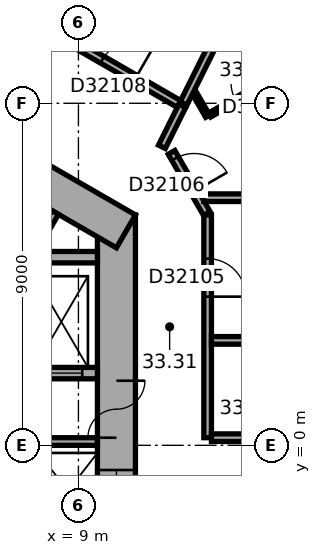
"""IFC4 building model, lengths in metres.
Left out: names, types, materials, properties, quantities, classifications, styles, units other than length and angle.
Written with IfcOpenShell. Run it as: python <this file> out.ifc"""

import sys

from ifc_helpers import new_model, si_unit, direction, frame, frame_2d, origin, place, context, subcontext, project, spatial, rectangle, extrude, element, fill, save


model = new_model("IFC4")
c1 = context("Model", 3, precision=1e-05, world=origin(), true_north=direction((0.0, 1.0)))
c2 = subcontext(c1, "Body", "Model", "MODEL_VIEW")
j1 = project(units=[si_unit("LENGTHUNIT", "METRE"), si_unit("PLANEANGLEUNIT", "RADIAN")], contexts=[c1])
p1 = place(None, origin())
s1 = spatial("IfcSite", under=j1, at=p1, CompositionType="ELEMENT")
p2 = place(p1, origin())
s2 = spatial("IfcBuilding", under=s1, at=p2, CompositionType="ELEMENT")
p3 = place(p2, frame((0.0, 0.0, 135.5)))
s3 = spatial("IfcBuildingStorey", under=s2, at=p3, CompositionType="ELEMENT", Elevation=135.5)
p4 = place(p3, frame((10.0, -6.062, 0.0), z_axis=(0.0, 0.0, 1.0), x_axis=(0.0, 1.0, 0.0)))
e1 = element("IfcWall", 1, at=p4, inside=s3, PredefinedType="SHEAR", context=c2, shape_type="SweptSolid", body=[
    extrude(rectangle(XDim=12.125, YDim=1.0, at=frame_2d((6.062, 0.0))), origin(), (0.0, 0.0, 1.0), 3.7),
])
p5 = place(p4, frame((6.262, 0.0, 0.0)))
e2 = element("IfcOpeningElement", 2, at=p5, cuts=e1, PredefinedType="OPENING", context=c2, shape_type="SweptSolid", body=[
    extrude(rectangle(XDim=1.5, YDim=2.1, at=frame_2d((0.75, 1.05))), frame((0.0, 0.51, 0.0), z_axis=(0.0, -1.0, 0.0), x_axis=(1.0, 0.0, 0.0)), (0.0, 0.0, 1.0), 1.02),
])
p6 = place(p4, frame((1.712, 0.0, 0.0)))
e3 = element("IfcOpeningElement", 3, at=p6, cuts=e1, PredefinedType="OPENING", context=c2, shape_type="SweptSolid", body=[
    extrude(rectangle(XDim=1.1, YDim=2.1, at=frame_2d((0.55, 1.05))), frame((0.0, 0.51, 0.0), z_axis=(0.0, -1.0, 0.0), x_axis=(1.0, 0.0, 0.0)), (0.0, 0.0, 1.0), 1.02),
])
p7 = place(p4, frame((4.312, 0.0, 0.0)))
e4 = element("IfcOpeningElement", 4, at=p7, cuts=e1, PredefinedType="OPENING", context=c2, shape_type="SweptSolid", body=[
    extrude(rectangle(XDim=1.1, YDim=2.1, at=frame_2d((0.55, 1.05))), frame((0.0, 0.51, 0.0), z_axis=(0.0, -1.0, 0.0), x_axis=(1.0, 0.0, 0.0)), (0.0, 0.0, 1.0), 1.02),
])
p8 = place(p3, frame((10.25, 5.629, 0.0), z_axis=(0.0, 0.0, 1.0), x_axis=(-0.866022616891, 0.50000482701, 0.0)))
e5 = element("IfcWall", 5, at=p8, inside=s3, PredefinedType="SHEAR", context=c2, shape_type="SweptSolid", body=[
    extrude(rectangle(XDim=12.125, YDim=1.0, at=frame_2d((6.062, 0.0))), origin(), (0.0, 0.0, 1.0), 3.7),
])
p9 = place(p8, frame((2.612, 0.0, 0.0)))
e6 = element("IfcOpeningElement", 6, at=p9, cuts=e5, PredefinedType="OPENING", context=c2, shape_type="SweptSolid", body=[
    extrude(rectangle(XDim=1.1, YDim=2.1, at=frame_2d((0.55, 1.05))), frame((0.0, 0.51, 0.0), z_axis=(0.0, -1.0, 0.0), x_axis=(1.0, 0.0, 0.0)), (0.0, 0.0, 1.0), 1.02),
])
p10 = place(p8, frame((5.212, 0.0, 0.0)))
e7 = element("IfcOpeningElement", 7, at=p10, cuts=e5, PredefinedType="OPENING", context=c2, shape_type="SweptSolid", body=[
    extrude(rectangle(XDim=1.1, YDim=2.1, at=frame_2d((0.55, 1.05))), frame((0.0, 0.51, 0.0), z_axis=(0.0, -1.0, 0.0), x_axis=(1.0, 0.0, 0.0)), (0.0, 0.0, 1.0), 1.02),
])
p11 = place(p8, frame((7.812, 0.0, 0.0)))
e8 = element("IfcOpeningElement", 8, at=p11, cuts=e5, PredefinedType="OPENING", context=c2, shape_type="SweptSolid", body=[
    extrude(rectangle(XDim=1.1, YDim=2.1, at=frame_2d((0.55, 1.05))), frame((0.0, 0.51, 0.0), z_axis=(0.0, -1.0, 0.0), x_axis=(1.0, 0.0, 0.0)), (0.0, 0.0, 1.0), 1.02),
])
for number, where, z_axis, x_axis in (
    (9, (7.3, 0.1, 0.0), (0.0, 0.0, 1.0), (1.0, 0.0, 0.0)),
    (10, (7.287, 4.222, 0.0), (0.0, 0.0, 1.0), (0.5, 0.866, 0.0)),
):
    element("IfcWall", number, at=place(p3, frame(where, z_axis=z_axis, x_axis=x_axis)), inside=s3, PredefinedType="PARTITIONING", context=c2, shape_type="SweptSolid", body=[
        extrude(rectangle(XDim=2.2, YDim=0.2, at=frame_2d((1.1, 0.0))), origin(), (0.0, 0.0, 1.0), 3.35),
    ])
p12 = place(p3, frame((7.3, 1.9, 0.0), z_axis=(0.0, 0.0, 1.0), x_axis=(1.0, 0.0, 0.0)))
e11 = element("IfcWall", 11, at=p12, inside=s3, PredefinedType="SHEAR", context=c2, shape_type="SweptSolid", body=[
    extrude(rectangle(XDim=2.2, YDim=0.3, at=frame_2d((1.1, 0.0))), origin(), (0.0, 0.0, 1.0), 3.35),
])
p13 = place(p12, frame((0.7, 0.0, 0.0)))
e12 = element("IfcOpeningElement", 12, at=p13, cuts=e11, PredefinedType="OPENING", context=c2, shape_type="SweptSolid", body=[
    extrude(rectangle(XDim=1.1, YDim=2.1, at=frame_2d((0.55, 1.05))), frame((0.0, 0.16, 0.0), z_axis=(0.0, -1.0, 0.0), x_axis=(1.0, 0.0, 0.0)), (0.0, 0.0, 1.0), 0.32),
])
p14 = place(p3, frame((7.3, 4.95, 0.0), z_axis=(0.0, 0.0, 1.0), x_axis=(1.0, 0.0, 0.0)))
e13 = element("IfcWall", 13, at=p14, inside=s3, PredefinedType="SHEAR", context=c2, shape_type="SweptSolid", body=[
    extrude(rectangle(XDim=2.2, YDim=0.3, at=frame_2d((1.1, 0.0))), origin(), (0.0, 0.0, 1.0), 3.35),
])
p15 = place(p3, frame((11.196, 7.854, 0.0), z_axis=(0.0, 0.0, 1.0), x_axis=(0.446241040303, 0.894912808015, 0.0)))
e14 = element("IfcWall", 14, at=p15, inside=s3, PredefinedType="PARTITIONING", context=c2, shape_type="SweptSolid", body=[
    extrude(rectangle(XDim=1.205, YDim=0.2, at=frame_2d((0.603, 0.0))), origin(), (0.0, 0.0, 1.0), 3.35),
])
p16 = place(p3, frame((11.646, 8.981, 0.0), z_axis=(0.0, 0.0, 1.0), x_axis=(-0.866027142779, 0.499996987961, 0.0)))
e15 = element("IfcWall", 15, at=p16, inside=s3, PredefinedType="PARTITIONING", context=c2, shape_type="SweptSolid", body=[
    extrude(rectangle(XDim=9.597, YDim=0.2, at=frame_2d((4.798, 0.0))), origin(), (0.0, 0.0, 1.0), 3.35),
])
p17 = place(p16, frame((1.331, 0.0, 0.0)))
e16 = element("IfcOpeningElement", 16, at=p17, cuts=e15, PredefinedType="OPENING", context=c2, shape_type="SweptSolid", body=[
    extrude(rectangle(XDim=1.0, YDim=2.1, at=frame_2d((0.5, 1.05))), frame((0.0, 0.11, 0.0), z_axis=(0.0, -1.0, 0.0), x_axis=(1.0, 0.0, 0.0)), (0.0, 0.0, 1.0), 0.22),
])
p18 = place(p16, frame((5.042, 0.0, 0.0)))
e17 = element("IfcOpeningElement", 17, at=p18, cuts=e15, PredefinedType="OPENING", context=c2, shape_type="SweptSolid", body=[
    extrude(rectangle(XDim=1.0, YDim=2.1, at=frame_2d((0.5, 1.05))), frame((0.0, 0.11, 0.0), z_axis=(0.0, -1.0, 0.0), x_axis=(1.0, 0.0, 0.0)), (0.0, 0.0, 1.0), 0.22),
])
p19 = place(p16, frame((8.01, 0.0, 0.0)))
e18 = element("IfcOpeningElement", 18, at=p19, cuts=e15, PredefinedType="OPENING", context=c2, shape_type="SweptSolid", body=[
    extrude(rectangle(XDim=1.0, YDim=2.1, at=frame_2d((0.5, 1.05))), frame((0.0, 0.11, 0.0), z_axis=(0.0, -1.0, 0.0), x_axis=(1.0, 0.0, 0.0)), (0.0, 0.0, 1.0), 0.22),
])
p20 = place(p3, frame((12.38, 6.097, 0.0), z_axis=(0.0, 0.0, 1.0), x_axis=(-0.499964847546, 0.866045698112, 0.0)))
e19 = element("IfcWall", 19, at=p20, inside=s3, PredefinedType="PARTITIONING", context=c2, shape_type="SweptSolid", body=[
    extrude(rectangle(XDim=1.86, YDim=0.2, at=frame_2d((0.93, 0.0))), origin(), (0.0, 0.0, 1.0), 3.35),
])
p21 = place(p20, frame((0.672, 0.0, 0.0)))
e20 = element("IfcOpeningElement", 20, at=p21, cuts=e19, PredefinedType="OPENING", context=c2, shape_type="SweptSolid", body=[
    extrude(rectangle(XDim=1.0, YDim=2.1, at=frame_2d((0.5, 1.05))), frame((0.0, 0.11, 0.0), z_axis=(0.0, -1.0, 0.0), x_axis=(1.0, 0.0, 0.0)), (0.0, 0.0, 1.0), 0.22),
])
p22 = place(p3, frame((12.4, 0.201, 0.0), z_axis=(0.0, 0.0, 1.0), x_axis=(0.0, 1.0, 0.0)))
e21 = element("IfcWall", 21, at=p22, inside=s3, PredefinedType="PARTITIONING", context=c2, shape_type="SweptSolid", body=[
    extrude(rectangle(XDim=5.861, YDim=0.2, at=frame_2d((2.931, 0.0))), origin(), (0.0, 0.0, 1.0), 3.35),
])
p23 = place(p22, frame((3.711, 0.0, 0.0)))
e22 = element("IfcOpeningElement", 22, at=p23, cuts=e21, PredefinedType="OPENING", context=c2, shape_type="SweptSolid", body=[
    extrude(rectangle(XDim=1.0, YDim=2.1, at=frame_2d((0.5, 1.05))), frame((0.0, 0.11, 0.0), z_axis=(0.0, -1.0, 0.0), x_axis=(1.0, 0.0, 0.0)), (0.0, 0.0, 1.0), 0.22),
])
p24 = place(p3, frame((12.401, 8.661, 0.0), z_axis=(0.0, 0.0, 1.0), x_axis=(-0.499831418649, 0.866122712398, 0.0)))
e23 = element("IfcWall", 23, at=p24, inside=s3, PredefinedType="PARTITIONING", context=c2, shape_type="SweptSolid", body=[
    extrude(rectangle(XDim=0.711, YDim=0.12, at=frame_2d((0.355, 0.0))), origin(), (0.0, 0.0, 1.0), 3.35),
])
p25 = place(p3, frame((13.501, 0.201, 0.0), z_axis=(0.0, 0.0, 1.0), x_axis=(-1.0, 0.0, 0.0)))
e24 = element("IfcWall", 24, at=p25, inside=s3, PredefinedType="PARTITIONING", context=c2, shape_type="SweptSolid", body=[
    extrude(rectangle(XDim=1.001, YDim=0.2, at=frame_2d((0.5, 0.0))), origin(), (0.0, 0.0, 1.0), 3.35),
])
p26 = place(p3, frame((14.601, 9.931, 0.0), z_axis=(0.0, 0.0, 1.0), x_axis=(-0.866023285932, -0.50000366821, 0.0)))
e25 = element("IfcWall", 25, at=p26, inside=s3, PredefinedType="PARTITIONING", context=c2, shape_type="SweptSolid", body=[
    extrude(rectangle(XDim=2.48, YDim=0.12, at=frame_2d((1.24, 0.0))), origin(), (0.0, 0.0, 1.0), 3.35),
])
p27 = place(p26, frame((0.79, 0.0, 0.0)))
e26 = element("IfcOpeningElement", 26, at=p27, cuts=e25, PredefinedType="OPENING", context=c2, shape_type="SweptSolid", body=[
    extrude(rectangle(XDim=0.9, YDim=2.1, at=frame_2d((0.45, 1.05))), frame((0.0, 0.07, 0.0), z_axis=(0.0, -1.0, 0.0), x_axis=(1.0, 0.0, 0.0)), (0.0, 0.0, 1.0), 0.14),
])
p28 = place(p3, frame((15.09, 15.663, 0.0), z_axis=(0.0, 0.0, 1.0), x_axis=(-0.446203977428, -0.89493128816, 0.0)))
e27 = element("IfcWall", 27, at=p28, inside=s3, PredefinedType="PARTITIONING", context=c2, shape_type="SweptSolid", body=[
    extrude(rectangle(XDim=7.45, YDim=0.2, at=frame_2d((3.725, 0.0))), origin(), (0.0, 0.0, 1.0), 3.35),
])
p29 = place(p3, frame((20.75, 2.761, 0.0), z_axis=(0.0, 0.0, 1.0), x_axis=(-1.0, 0.0, 0.0)))
e28 = element("IfcWall", 28, at=p29, inside=s3, PredefinedType="PARTITIONING", context=c2, shape_type="SweptSolid", body=[
    extrude(rectangle(XDim=8.25, YDim=0.2, at=frame_2d((4.125, 0.0))), origin(), (0.0, 0.0, 1.0), 3.35),
])
p30 = place(p3, frame((20.75, 6.515, 0.0), z_axis=(0.0, 0.0, 1.0), x_axis=(-1.0, 0.0, 0.0)))
e29 = element("IfcWall", 29, at=p30, inside=s3, PredefinedType="PARTITIONING", context=c2, shape_type="SweptSolid", body=[
    extrude(rectangle(XDim=8.452, YDim=0.2, at=frame_2d((4.226, 0.0))), origin(), (0.0, 0.0, 1.0), 3.35),
])
p31 = place(p5, origin())
e30 = element("IfcDoor", 30, at=p31, inside=s3, OperationType="DOUBLE_DOOR_SINGLE_SWING", PredefinedType="DOOR", context=c2, shape_type="SweptSolid", body=[
    extrude(rectangle(XDim=1.5, YDim=2.1, at=frame_2d((0.75, 1.05))), frame((0.0, 0.025, 0.0), z_axis=(0.0, -1.0, 0.0), x_axis=(1.0, 0.0, 0.0)), (0.0, 0.0, 1.0), 0.05),
])
fill(e2, e30)
p32 = place(p13, origin())
e31 = element("IfcDoor", 31, at=p32, inside=s3, OperationType="DOUBLE_DOOR_SLIDING", PredefinedType="DOOR", context=c2, shape_type="SweptSolid", body=[
    extrude(rectangle(XDim=1.1, YDim=2.1, at=frame_2d((0.55, 1.05))), frame((0.0, 0.025, 0.0), z_axis=(0.0, -1.0, 0.0), x_axis=(1.0, 0.0, 0.0)), (0.0, 0.0, 1.0), 0.05),
])
fill(e12, e31)
p33 = place(p7, origin())
e32 = element("IfcDoor", 32, at=p33, inside=s3, OperationType="DOUBLE_DOOR_SLIDING", PredefinedType="DOOR", context=c2, shape_type="SweptSolid", body=[
    extrude(rectangle(XDim=1.1, YDim=2.1, at=frame_2d((0.55, 1.05))), frame((0.0, 0.025, 0.0), z_axis=(0.0, -1.0, 0.0), x_axis=(1.0, 0.0, 0.0)), (0.0, 0.0, 1.0), 0.05),
])
fill(e4, e32)
p34 = place(p23, origin())
e33 = element("IfcDoor", 33, at=p34, inside=s3, OperationType="SINGLE_SWING_LEFT", PredefinedType="DOOR", context=c2, shape_type="SweptSolid", body=[
    extrude(rectangle(XDim=1.0, YDim=2.1, at=frame_2d((0.5, 1.05))), frame((0.0, 0.025, 0.0), z_axis=(0.0, -1.0, 0.0), x_axis=(1.0, 0.0, 0.0)), (0.0, 0.0, 1.0), 0.05),
])
fill(e22, e33)
p35 = place(p21, origin())
e34 = element("IfcDoor", 34, at=p35, inside=s3, OperationType="SINGLE_SWING_LEFT", PredefinedType="DOOR", context=c2, shape_type="SweptSolid", body=[
    extrude(rectangle(XDim=1.0, YDim=2.1, at=frame_2d((0.5, 1.05))), frame((0.0, 0.025, 0.0), z_axis=(0.0, -1.0, 0.0), x_axis=(1.0, 0.0, 0.0)), (0.0, 0.0, 1.0), 0.05),
])
fill(e20, e34)
p36 = place(p27, origin())
e35 = element("IfcDoor", 35, at=p36, inside=s3, OperationType="SINGLE_SWING_LEFT", PredefinedType="DOOR", context=c2, shape_type="SweptSolid", body=[
    extrude(rectangle(XDim=0.9, YDim=2.1, at=frame_2d((0.45, 1.05))), frame((0.0, 0.025, 0.0), z_axis=(0.0, -1.0, 0.0), x_axis=(1.0, 0.0, 0.0)), (0.0, 0.0, 1.0), 0.05),
])
fill(e26, e35)
p37 = place(p17, origin())
e36 = element("IfcDoor", 36, at=p37, inside=s3, OperationType="SINGLE_SWING_LEFT", PredefinedType="DOOR", context=c2, shape_type="SweptSolid", body=[
    extrude(rectangle(XDim=1.0, YDim=2.1, at=frame_2d((0.5, 1.05))), frame((0.0, 0.025, 0.0), z_axis=(0.0, -1.0, 0.0), x_axis=(1.0, 0.0, 0.0)), (0.0, 0.0, 1.0), 0.05),
])
fill(e16, e36)
save(model, sys.argv[1])
